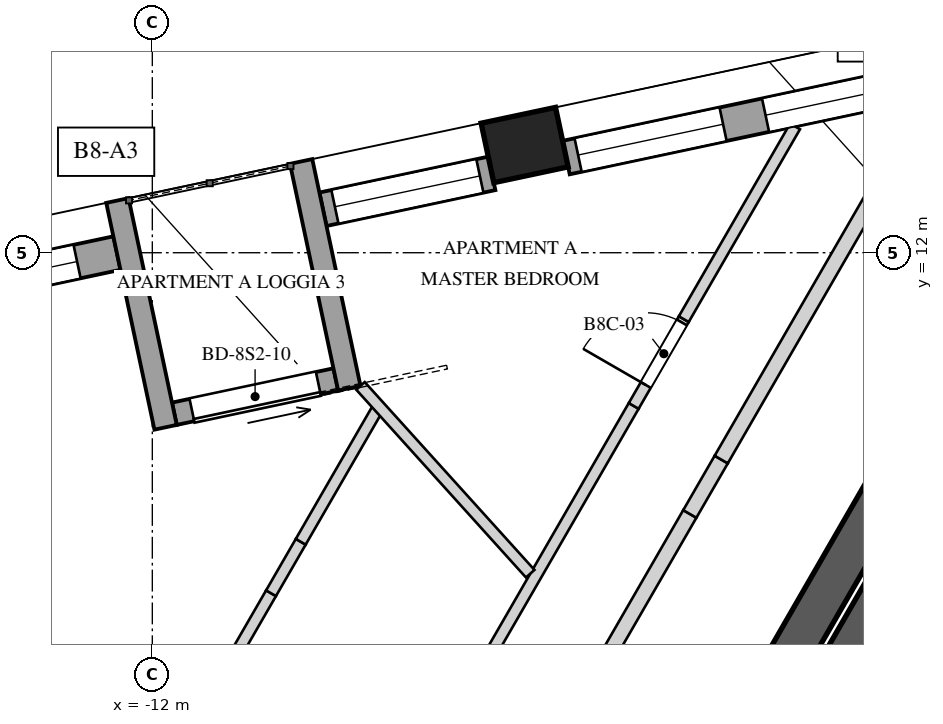
"""IFC4 building model, lengths in metres.
Left out: names, types, materials, properties, quantities, classifications, styles, units other than length and angle.
Written with IfcOpenShell. Run it as: python <this file> out.ifc"""

import sys

from ifc_helpers import new_model, si_unit, direction, frame, frame_2d, origin, origin_2d, place, context, subcontext, project, spatial, polyline, rectangle, outline, extrude, element, fill, save


model = new_model("IFC4")
c1 = context("Model", 3, precision=1e-05, world=origin(), true_north=direction((0.0, 1.0)))
c2 = subcontext(c1, "Body", "Model", "MODEL_VIEW")
j1 = project(units=[si_unit("LENGTHUNIT", "METRE"), si_unit("PLANEANGLEUNIT", "RADIAN")], contexts=[c1])
p1 = place(None, origin())
s1 = spatial("IfcSite", under=j1, at=p1, CompositionType="ELEMENT")
p2 = place(p1, origin())
s2 = spatial("IfcBuilding", under=s1, at=p2, CompositionType="ELEMENT")
p3 = place(p2, frame((0.0, 0.0, 344.4)))
s3 = spatial("IfcBuildingStorey", under=s2, at=p3, CompositionType="ELEMENT", Elevation=344.4)
p4 = place(p3, frame((-1.285, 10.725, 0.0), z_axis=(0.0, 0.0, 1.0), x_axis=(-0.499994590896, -0.86602852671, 0.0)))
e1 = element("IfcWall", 1, at=p4, inside=s3, PredefinedType="SHEAR", context=c2, shape_type="SweptSolid", body=[
    extrude(rectangle(XDim=17.292, YDim=0.55, at=frame_2d((8.646, 0.0))), origin(), (0.0, 0.0, 1.0), 4.0),
])
p5 = place(p4, frame((6.851, 0.0, 0.0)))
e2 = element("IfcOpeningElement", 2, at=p5, cuts=e1, PredefinedType="OPENING", context=c2, shape_type="SweptSolid", body=[
    extrude(rectangle(XDim=1.0, YDim=2.4, at=frame_2d((0.5, 1.2))), frame((0.0, 0.285, 0.0), z_axis=(0.0, -1.0, 0.0), x_axis=(1.0, 0.0, 0.0)), (0.0, 0.0, 1.0), 0.57),
])
p6 = place(p4, frame((15.089, 0.0, 0.0)))
e3 = element("IfcOpeningElement", 3, at=p6, cuts=e1, PredefinedType="OPENING", context=c2, shape_type="SweptSolid", body=[
    extrude(rectangle(XDim=0.8, YDim=2.1, at=frame_2d((0.4, 1.05))), frame((0.0, 0.285, 0.0), z_axis=(0.0, -1.0, 0.0), x_axis=(1.0, 0.0, 0.0)), (0.0, 0.0, 1.0), 0.57),
])
p7 = place(p3, frame((-7.102, 13.417, 0.0), z_axis=(0.0, 0.0, 1.0), x_axis=(-0.978147600734, -0.207911690818, 0.0)))
e4 = element("IfcColumn", 4, at=p7, inside=s3, PredefinedType="COLUMN", context=c2, shape_type="SweptSolid", body=[
    extrude(rectangle(XDim=1.0, YDim=0.8, at=origin_2d()), origin(), (0.0, 0.0, 1.0), 4.0),
])
p8 = place(p3, frame((0.599, 14.772, 0.0), z_axis=(0.0, 0.0, 1.0), x_axis=(-0.978151299843, -0.207894287118, 0.0)))
e5 = element("IfcWall", 5, at=p8, inside=s3, PredefinedType="SOLIDWALL", context=c2, shape_type="SweptSolid", body=[
    extrude(rectangle(XDim=7.314, YDim=0.45, at=frame_2d((3.657, 0.0))), origin(), (0.0, 0.0, 1.0), 3.3),
])
p9 = place(p8, frame((0.161, 0.0, 0.4)))
e6 = element("IfcOpeningElement", 6, at=p9, cuts=e5, PredefinedType="OPENING", context=c2, shape_type="SweptSolid", body=[
    extrude(rectangle(XDim=1.95, YDim=2.75, at=frame_2d((0.975, 1.375))), frame((0.0, 0.235, 0.0), z_axis=(0.0, -1.0, 0.0), x_axis=(1.0, 0.0, 0.0)), (0.0, 0.0, 1.0), 0.47),
])
p10 = place(p8, frame((2.682, 0.0, 0.4)))
e7 = element("IfcOpeningElement", 7, at=p10, cuts=e5, PredefinedType="OPENING", context=c2, shape_type="SweptSolid", body=[
    extrude(rectangle(XDim=1.95, YDim=2.75, at=frame_2d((0.975, 1.375))), frame((0.0, 0.235, 0.0), z_axis=(0.0, -1.0, 0.0), x_axis=(1.0, 0.0, 0.0)), (0.0, 0.0, 1.0), 0.47),
])
p11 = place(p8, frame((5.203, 0.0, 0.4)))
e8 = element("IfcOpeningElement", 8, at=p11, cuts=e5, PredefinedType="OPENING", context=c2, shape_type="SweptSolid", body=[
    extrude(rectangle(XDim=1.95, YDim=2.75, at=frame_2d((0.975, 1.375))), frame((0.0, 0.235, 0.0), z_axis=(0.0, -1.0, 0.0), x_axis=(1.0, 0.0, 0.0)), (0.0, 0.0, 1.0), 0.47),
])
p12 = place(p3, frame((-7.533, 13.044, 0.0), z_axis=(0.0, 0.0, 1.0), x_axis=(-0.978153386925, -0.207884467067, 0.0)))
e9 = element("IfcWall", 9, at=p12, inside=s3, PredefinedType="SOLIDWALL", context=c2, shape_type="SweptSolid", body=[
    extrude(rectangle(XDim=2.271, YDim=0.45, at=frame_2d((1.136, 0.0))), origin(), (0.0, 0.0, 1.0), 3.3),
])
p13 = place(p12, frame((0.161, 0.0, 0.4)))
e10 = element("IfcOpeningElement", 10, at=p13, cuts=e9, PredefinedType="OPENING", context=c2, shape_type="SweptSolid", body=[
    extrude(rectangle(XDim=1.95, YDim=2.75, at=frame_2d((0.975, 1.375))), frame((0.0, 0.235, 0.0), z_axis=(0.0, -1.0, 0.0), x_axis=(1.0, 0.0, 0.0)), (0.0, 0.0, 1.0), 0.47),
])
p14 = place(p3, frame((-12.466, 11.995, 0.0), z_axis=(0.0, 0.0, 1.0), x_axis=(-0.978153386925, -0.207884467067, 0.0)))
e11 = element("IfcWall", 11, at=p14, inside=s3, PredefinedType="SOLIDWALL", context=c2, shape_type="SweptSolid", body=[
    extrude(rectangle(XDim=2.271, YDim=0.45, at=frame_2d((1.136, 0.0))), origin(), (0.0, 0.0, 1.0), 3.3),
])
p15 = place(p14, frame((0.536, 0.0, 0.4)))
e12 = element("IfcOpeningElement", 12, at=p15, cuts=e11, PredefinedType="OPENING", context=c2, shape_type="SweptSolid", body=[
    extrude(rectangle(XDim=1.2, YDim=2.75, at=frame_2d((0.6, 1.375))), frame((0.0, 0.235, 0.0), z_axis=(0.0, -1.0, 0.0), x_axis=(1.0, 0.0, 0.0)), (0.0, 0.0, 1.0), 0.47),
])
p16 = place(p3, frame((-9.586, 10.333, 0.0), z_axis=(0.0, 0.0, 1.0), x_axis=(-0.978148276005, -0.207908513891, 0.0)))
e13 = element("IfcWall", 13, at=p16, inside=s3, PredefinedType="SOLIDWALL", context=c2, shape_type="SweptSolid", body=[
    extrude(rectangle(XDim=2.171, YDim=0.3, at=frame_2d((1.085, 0.0))), origin(), (0.0, 0.0, 1.0), 3.3),
])
p17 = place(p16, frame((0.236, 0.0, 0.0)))
e14 = element("IfcOpeningElement", 14, at=p17, cuts=e13, PredefinedType="OPENING", context=c2, shape_type="SweptSolid", body=[
    extrude(rectangle(XDim=1.7, YDim=2.5, at=frame_2d((0.85, 1.25))), frame((0.0, 0.16, 0.0), z_axis=(0.0, -1.0, 0.0), x_axis=(1.0, 0.0, 0.0)), (0.0, 0.0, 1.0), 0.32),
])
for number, where, z_axis, x_axis in (
    (15, (-10.042, 13.201, 0.0), (0.0, 0.0, 1.0), (0.208, -0.978, 0.0)),
    (16, (-12.459, 12.687, 0.0), (0.0, 0.0, 1.0), (0.208, -0.978, 0.0)),
):
    element("IfcWall", number, at=place(p3, frame(where, z_axis=z_axis, x_axis=x_axis)), inside=s3, PredefinedType="SOLIDWALL", context=c2, shape_type="SweptSolid", body=[
        extrude(rectangle(XDim=3.05, YDim=0.3, at=frame_2d((1.525, 0.0))), origin(), (0.0, 0.0, 1.0), 3.3),
    ])
p18 = place(p3, frame((-0.918, 9.86, 0.0), z_axis=(0.0, 0.0, 1.0), x_axis=(-0.500026960575, -0.86600983753, 0.0)))
e17 = element("IfcWall", 17, at=p18, inside=s3, PredefinedType="SOLIDWALL", context=c2, shape_type="SweptSolid", body=[
    extrude(rectangle(XDim=6.2, YDim=0.75, at=frame_2d((3.1, 0.0))), origin(), (0.0, 0.0, 1.0), 3.65),
])
p19 = place(p3, frame((-11.296, 6.035, 0.0), z_axis=(0.0, 0.0, 1.0), x_axis=(0.500059337743, 0.865991142412, 0.0)))
e18 = element("IfcWall", 18, at=p19, inside=s3, PredefinedType="PARTITIONING", context=c2, shape_type="SweptSolid", body=[
    extrude(rectangle(XDim=1.715, YDim=0.15, at=frame_2d((0.857, 0.0))), origin(), (0.0, 0.0, 1.0), 3.65),
])
p20 = place(p3, frame((-10.438, 7.52, 0.0), z_axis=(0.0, 0.0, 1.0), x_axis=(0.500001804394, 0.866024362014, 0.0)))
e19 = element("IfcWall", 19, at=p20, inside=s3, PredefinedType="PARTITIONING", context=c2, shape_type="SweptSolid", body=[
    extrude(rectangle(XDim=0.782, YDim=0.15, at=frame_2d((0.391, 0.0))), origin(), (0.0, 0.0, 1.0), 2.75),
])
p21 = place(p3, frame((-10.047, 8.197, 0.0), z_axis=(0.0, 0.0, 1.0), x_axis=(0.499972721762, 0.86604115231, 0.0)))
e20 = element("IfcWall", 20, at=p21, inside=s3, PredefinedType="PARTITIONING", context=c2, shape_type="SweptSolid", body=[
    extrude(rectangle(XDim=2.055, YDim=0.15, at=frame_2d((1.027, 0.0))), origin(), (0.0, 0.0, 1.0), 3.65),
])
p22 = place(p3, frame((-7.727, 6.417, 0.0), z_axis=(0.0, 0.0, 1.0), x_axis=(0.50002680699, 0.866009926209, 0.0)))
e21 = element("IfcWall", 21, at=p22, inside=s3, PredefinedType="PARTITIONING", context=c2, shape_type="SweptSolid", body=[
    extrude(rectangle(XDim=4.12, YDim=0.15, at=frame_2d((2.06, 0.0))), origin(), (0.0, 0.0, 1.0), 3.65),
])
p23 = place(p3, frame((-5.667, 9.985, 0.0), z_axis=(0.0, 0.0, 1.0), x_axis=(0.499904166098, 0.866080726444, 0.0)))
e22 = element("IfcWall", 22, at=p23, inside=s3, PredefinedType="PARTITIONING", context=c2, shape_type="SweptSolid", body=[
    extrude(outline(polyline([(0.0, 0.0), (1.318, 0.0), (1.318, 3.65), (0.797, 3.65), (0.797, 2.95), (0.0, 2.95), (0.0, 0.0)])), frame((0.0, 0.075, 0.0), z_axis=(0.0, -1.0, 0.0), x_axis=(1.0, 0.0, 0.0)), (0.0, 0.0, 1.0), 0.15),
])
p24 = place(p23, frame((0.318, 0.0, 0.0)))
e23 = element("IfcOpeningElement", 23, at=p24, cuts=e22, PredefinedType="OPENING", context=c2, shape_type="SweptSolid", body=[
    extrude(rectangle(XDim=0.95, YDim=2.4, at=frame_2d((0.475, 1.2))), frame((0.0, 0.085, 0.0), z_axis=(0.0, -1.0, 0.0), x_axis=(1.0, 0.0, 0.0)), (0.0, 0.0, 1.0), 0.17),
])
p25 = place(p3, frame((-5.008, 11.126, 0.0), z_axis=(0.0, 0.0, 1.0), x_axis=(0.500013600279, 0.866017551517, 0.0)))
e24 = element("IfcWall", 24, at=p25, inside=s3, PredefinedType="PARTITIONING", context=c2, shape_type="SweptSolid", body=[
    extrude(rectangle(XDim=2.928, YDim=0.15, at=frame_2d((1.464, 0.0))), origin(), (0.0, 0.0, 1.0), 3.65),
])
p26 = place(p3, frame((-9.261, 10.248, 0.0), z_axis=(0.0, 0.0, 1.0), x_axis=(0.670469843063, -0.741936782714, 0.0)))
e25 = element("IfcWall", 25, at=p26, inside=s3, PredefinedType="PARTITIONING", context=c2, shape_type="SweptSolid", body=[
    extrude(rectangle(XDim=3.331, YDim=0.15, at=frame_2d((1.666, 0.0))), origin(), (0.0, 0.0, 1.0), 3.65),
])
p27 = place(p3, frame((-6.64, 5.599, 0.0), z_axis=(0.0, 0.0, 1.0), x_axis=(0.499989998285, 0.8660311782, 0.0)))
e26 = element("IfcWall", 26, at=p27, inside=s3, PredefinedType="SOLIDWALL", context=c2, shape_type="SweptSolid", body=[
    extrude(rectangle(XDim=3.423, YDim=0.2, at=frame_2d((1.711, 0.0))), origin(), (0.0, 0.0, 1.0), 3.65),
])
p28 = place(p3, frame((-4.929, 8.563, 0.0), z_axis=(0.0, 0.0, 1.0), x_axis=(0.500046299512, 0.865998671098, 0.0)))
e27 = element("IfcWall", 27, at=p28, inside=s3, PredefinedType="SOLIDWALL", context=c2, shape_type="SweptSolid", body=[
    extrude(rectangle(XDim=0.827, YDim=0.2, at=frame_2d((0.413, 0.0))), origin(), (0.0, 0.0, 1.0), 2.95),
])
p29 = place(p3, frame((-4.515, 9.279, 0.0), z_axis=(0.0, 0.0, 1.0), x_axis=(0.499975428181, 0.866039589866, 0.0)))
e28 = element("IfcWall", 28, at=p29, inside=s3, PredefinedType="SOLIDWALL", context=c2, shape_type="SweptSolid", body=[
    extrude(rectangle(XDim=4.066, YDim=0.2, at=frame_2d((2.033, 0.0))), origin(), (0.0, 0.0, 1.0), 3.65),
])
p30 = place(p10, origin())
e29 = element("IfcWindow", 29, at=p30, inside=s3, PartitioningType="SINGLE_PANEL", PredefinedType="WINDOW", context=c2, shape_type="SweptSolid", body=[
    extrude(rectangle(XDim=1.95, YDim=2.75, at=frame_2d((0.975, 1.375))), frame((0.0, 0.03, 0.0), z_axis=(0.0, -1.0, 0.0), x_axis=(1.0, 0.0, 0.0)), (0.0, 0.0, 1.0), 0.06),
])
fill(e7, e29)
p31 = place(p11, origin())
e30 = element("IfcWindow", 30, at=p31, inside=s3, PartitioningType="SINGLE_PANEL", PredefinedType="WINDOW", context=c2, shape_type="SweptSolid", body=[
    extrude(rectangle(XDim=1.95, YDim=2.75, at=frame_2d((0.975, 1.375))), frame((0.0, 0.03, 0.0), z_axis=(0.0, -1.0, 0.0), x_axis=(1.0, 0.0, 0.0)), (0.0, 0.0, 1.0), 0.06),
])
fill(e8, e30)
p32 = place(p13, origin())
e31 = element("IfcWindow", 31, at=p32, inside=s3, PartitioningType="SINGLE_PANEL", PredefinedType="WINDOW", context=c2, shape_type="SweptSolid", body=[
    extrude(rectangle(XDim=1.95, YDim=2.75, at=frame_2d((0.975, 1.375))), frame((0.0, 0.03, 0.0), z_axis=(0.0, -1.0, 0.0), x_axis=(1.0, 0.0, 0.0)), (0.0, 0.0, 1.0), 0.06),
])
fill(e10, e31)
p33 = place(p15, origin())
e32 = element("IfcWindow", 32, at=p33, inside=s3, PartitioningType="SINGLE_PANEL", PredefinedType="WINDOW", context=c2, shape_type="SweptSolid", body=[
    extrude(rectangle(XDim=1.2, YDim=2.75, at=frame_2d((0.6, 1.375))), frame((0.0, 0.03, 0.0), z_axis=(0.0, -1.0, 0.0), x_axis=(1.0, 0.0, 0.0)), (0.0, 0.0, 1.0), 0.06),
])
fill(e12, e32)
p34 = place(p17, origin())
e33 = element("IfcDoor", 33, at=p34, inside=s3, OperationType="SLIDING_TO_LEFT", PredefinedType="DOOR", context=c2, shape_type="SweptSolid", body=[
    extrude(rectangle(XDim=1.7, YDim=2.5, at=frame_2d((0.85, 1.25))), frame((0.0, 0.025, 0.0), z_axis=(0.0, -1.0, 0.0), x_axis=(1.0, 0.0, 0.0)), (0.0, 0.0, 1.0), 0.05),
])
fill(e14, e33)
p35 = place(p24, origin())
e34 = element("IfcDoor", 34, at=p35, inside=s3, OperationType="SINGLE_SWING_LEFT", PredefinedType="DOOR", context=c2, shape_type="SweptSolid", body=[
    extrude(rectangle(XDim=0.95, YDim=2.4, at=frame_2d((0.475, 1.2))), frame((0.0, 0.025, 0.0), z_axis=(0.0, -1.0, 0.0), x_axis=(1.0, 0.0, 0.0)), (0.0, 0.0, 1.0), 0.05),
])
fill(e23, e34)
save(model, sys.argv[1])
